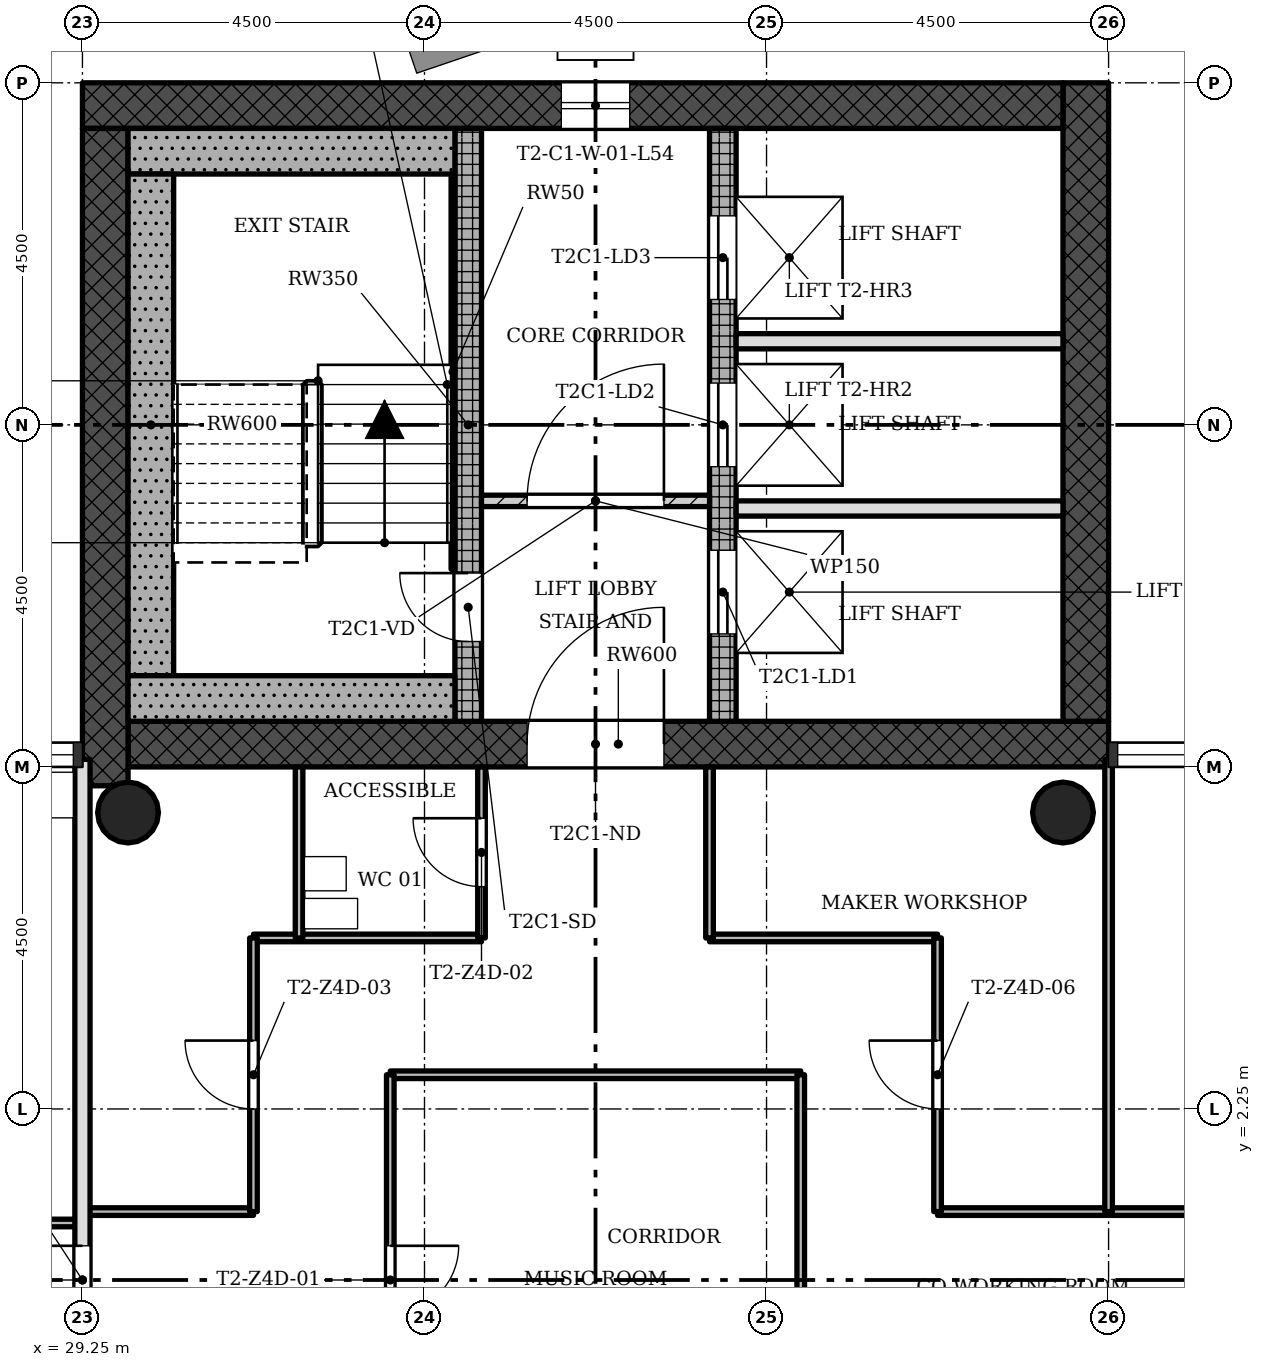
"""IFC4 building model, lengths in metres.
Left out: names, types, materials, properties, quantities, classifications, styles, units other than length and angle.
Written with IfcOpenShell. Run it as: python <this file> out.ifc"""

import sys

from ifc_helpers import new_model, si_unit, direction, frame, frame_2d, origin, origin_2d, place, context, subcontext, project, spatial, rectangle, hollow_circle, extrude, element, fill, save


model = new_model("IFC4")
c1 = context("Model", 3, precision=1e-05, world=origin(), true_north=direction((0.0, 1.0)))
c2 = subcontext(c1, "Body", "Model", "MODEL_VIEW")
j1 = project(units=[si_unit("LENGTHUNIT", "METRE"), si_unit("PLANEANGLEUNIT", "RADIAN")], contexts=[c1])
p1 = place(None, origin())
s1 = spatial("IfcSite", under=j1, at=p1, CompositionType="ELEMENT")
p2 = place(p1, origin())
s2 = spatial("IfcBuilding", under=s1, at=p2, CompositionType="ELEMENT")
p3 = place(p2, frame((0.0, 0.0, 196.0)))
s3 = spatial("IfcBuildingStorey", under=s2, at=p3, CompositionType="ELEMENT", Elevation=196.0)
p4 = place(p3, frame((29.85, 7.05, 0.0), z_axis=(0.0, 0.0, 1.0), x_axis=(1.0, 0.0, 0.0)))
e1 = element("IfcWall", 1, at=p4, inside=s3, PredefinedType="SHEAR", context=c2, shape_type="SweptSolid", body=[
    extrude(rectangle(XDim=12.9, YDim=0.6, at=frame_2d((6.45, 0.0))), origin(), (0.0, 0.0, 1.0), 3.4),
])
p5 = place(p4, frame((5.25, 0.0, 0.0)))
e2 = element("IfcOpeningElement", 2, at=p5, cuts=e1, PredefinedType="OPENING", context=c2, shape_type="SweptSolid", body=[
    extrude(rectangle(XDim=1.8, YDim=2.1, at=frame_2d((0.9, 1.05))), frame((0.0, 0.31, 0.0), z_axis=(0.0, -1.0, 0.0), x_axis=(1.0, 0.0, 0.0)), (0.0, 0.0, 1.0), 0.62),
])
p6 = place(p3, frame((42.45, 7.35, 0.0), z_axis=(0.0, 0.0, 1.0), x_axis=(0.0, 1.0, 0.0)))
e3 = element("IfcWall", 3, at=p6, inside=s3, PredefinedType="SHEAR", context=c2, shape_type="SweptSolid", body=[
    extrude(rectangle(XDim=8.4, YDim=0.6, at=frame_2d((4.2, 0.0))), origin(), (0.0, 0.0, 1.0), 3.4),
])
p7 = place(p3, frame((42.15, 15.45, 0.0), z_axis=(0.0, 0.0, 1.0), x_axis=(-1.0, 0.0, 0.0)))
e4 = element("IfcWall", 4, at=p7, inside=s3, PredefinedType="SHEAR", context=c2, shape_type="SweptSolid", body=[
    extrude(rectangle(XDim=12.9, YDim=0.6, at=frame_2d((6.45, 0.0))), origin(), (0.0, 0.0, 1.0), 3.4),
])
p8 = place(p7, frame((5.7, 0.0, 0.45)))
e5 = element("IfcOpeningElement", 5, at=p8, cuts=e4, PredefinedType="OPENING", context=c2, shape_type="SweptSolid", body=[
    extrude(rectangle(XDim=0.9, YDim=2.4, at=frame_2d((0.45, 1.2))), frame((0.0, 0.31, 0.0), z_axis=(0.0, -1.0, 0.0), x_axis=(1.0, 0.0, 0.0)), (0.0, 0.0, 1.0), 0.62),
])
p9 = place(p3, frame((29.55, 15.15, 0.0), z_axis=(0.0, 0.0, 1.0), x_axis=(0.0, -1.0, 0.0)))
e6 = element("IfcWall", 6, at=p9, inside=s3, PredefinedType="SHEAR", context=c2, shape_type="SweptSolid", body=[
    extrude(rectangle(XDim=8.648, YDim=0.6, at=frame_2d((4.324, 0.0))), origin(), (0.0, 0.0, 1.0), 3.4),
])
p10 = place(p3, frame((34.325, 7.35, 0.0), z_axis=(0.0, 0.0, 1.0), x_axis=(0.0, 1.0, 0.0)))
e7 = element("IfcWall", 7, at=p10, inside=s3, PredefinedType="SHEAR", context=c2, shape_type="SweptSolid", body=[
    extrude(rectangle(XDim=7.8, YDim=0.35, at=frame_2d((3.9, 0.0))), origin(), (0.0, 0.0, 1.0), 3.4),
])
p11 = place(p10, frame((1.05, 0.0, 0.0)))
e8 = element("IfcOpeningElement", 8, at=p11, cuts=e7, PredefinedType="OPENING", context=c2, shape_type="SweptSolid", body=[
    extrude(rectangle(XDim=0.9, YDim=2.1, at=frame_2d((0.45, 1.05))), frame((0.0, 0.185, 0.0), z_axis=(0.0, -1.0, 0.0), x_axis=(1.0, 0.0, 0.0)), (0.0, 0.0, 1.0), 0.37),
])
p12 = place(p3, frame((37.675, 7.35, 0.0), z_axis=(0.0, 0.0, 1.0), x_axis=(0.0, 1.0, 0.0)))
e9 = element("IfcWall", 9, at=p12, inside=s3, PredefinedType="SHEAR", context=c2, shape_type="SweptSolid", body=[
    extrude(rectangle(XDim=7.8, YDim=0.35, at=frame_2d((3.9, 0.0))), origin(), (0.0, 0.0, 1.0), 3.4),
])
p13 = place(p12, frame((1.15, 0.0, 0.0)))
e10 = element("IfcOpeningElement", 10, at=p13, cuts=e9, PredefinedType="OPENING", context=c2, shape_type="SweptSolid", body=[
    extrude(rectangle(XDim=1.1, YDim=2.1, at=frame_2d((0.55, 1.05))), frame((0.0, 0.185, 0.0), z_axis=(0.0, -1.0, 0.0), x_axis=(1.0, 0.0, 0.0)), (0.0, 0.0, 1.0), 0.37),
])
p14 = place(p12, frame((3.35, 0.0, 0.0)))
e11 = element("IfcOpeningElement", 11, at=p14, cuts=e9, PredefinedType="OPENING", context=c2, shape_type="SweptSolid", body=[
    extrude(rectangle(XDim=1.1, YDim=2.1, at=frame_2d((0.55, 1.05))), frame((0.0, 0.185, 0.0), z_axis=(0.0, -1.0, 0.0), x_axis=(1.0, 0.0, 0.0)), (0.0, 0.0, 1.0), 0.37),
])
p15 = place(p12, frame((5.55, 0.0, 0.0)))
e12 = element("IfcOpeningElement", 12, at=p15, cuts=e9, PredefinedType="OPENING", context=c2, shape_type="SweptSolid", body=[
    extrude(rectangle(XDim=1.1, YDim=2.1, at=frame_2d((0.55, 1.05))), frame((0.0, 0.185, 0.0), z_axis=(0.0, -1.0, 0.0), x_axis=(1.0, 0.0, 0.0)), (0.0, 0.0, 1.0), 0.37),
])
for number, where, z_axis, x_axis in (
    (13, (42.15, 6.15, 0.0), (0.0, 0.0, 1.0), (1.0, 0.0, 0.0)),
    (14, (29.85, 6.15, 0.0), (0.0, 0.0, 1.0), (1.0, 0.0, 0.0)),
):
    element("IfcColumn", number, at=place(p3, frame(where, z_axis=z_axis, x_axis=x_axis)), inside=s3, PredefinedType="COLUMN", context=c2, shape_type="SweptSolid", body=[
        extrude(hollow_circle(Radius=0.4, WallThickness=0.028, at=origin_2d()), origin(), (0.0, 0.0, 1.0), 3.4),
    ])
p16 = place(p3, frame((37.5, 10.25, 0.0), z_axis=(0.0, 0.0, 1.0), x_axis=(-1.0, 0.0, 0.0)))
e15 = element("IfcWall", 15, at=p16, inside=s3, PredefinedType="PARTITIONING", context=c2, shape_type="SweptSolid", body=[
    extrude(rectangle(XDim=3.0, YDim=0.15, at=frame_2d((1.5, 0.0))), origin(), (0.0, 0.0, 1.0), 3.0),
])
p17 = place(p16, frame((0.6, 0.0, 0.0)))
e16 = element("IfcOpeningElement", 16, at=p17, cuts=e15, PredefinedType="OPENING", context=c2, shape_type="SweptSolid", body=[
    extrude(rectangle(XDim=1.8, YDim=2.1, at=frame_2d((0.9, 1.05))), frame((0.0, 0.085, 0.0), z_axis=(0.0, -1.0, 0.0), x_axis=(1.0, 0.0, 0.0)), (0.0, 0.0, 1.0), 0.17),
])
for number, where, z_axis, x_axis in (
    (17, (42.15, 10.15, 0.0), (0.0, 0.0, 1.0), (-1.0, 0.0, 0.0)),
    (18, (42.15, 12.35, 0.0), (0.0, 0.0, 1.0), (-1.0, 0.0, 0.0)),
):
    element("IfcWall", number, at=place(p3, frame(where, z_axis=z_axis, x_axis=x_axis)), inside=s3, PredefinedType="SOLIDWALL", context=c2, shape_type="SweptSolid", body=[
        extrude(rectangle(XDim=4.3, YDim=0.2, at=frame_2d((2.15, 0.0))), origin(), (0.0, 0.0, 1.0), 3.0),
    ])
p18 = place(p3, frame((29.25, 0.75, 0.0), z_axis=(0.0, 0.0, 1.0), x_axis=(-1.0, 0.0, 0.0)))
e19 = element("IfcWall", 19, at=p18, inside=s3, PredefinedType="PARTITIONING", context=c2, shape_type="SweptSolid", body=[
    extrude(rectangle(XDim=7.8, YDim=0.1, at=frame_2d((3.9, 0.0))), origin(), (0.0, 0.0, 1.0), 3.0),
])
p19 = place(p18, frame((1.8, 0.0, 0.0)))
e20 = element("IfcOpeningElement", 20, at=p19, cuts=e19, PredefinedType="OPENING", context=c2, shape_type="SweptSolid", body=[
    extrude(rectangle(XDim=0.9, YDim=2.1, at=frame_2d((0.45, 1.05))), frame((0.0, 0.06, 0.0), z_axis=(0.0, -1.0, 0.0), x_axis=(1.0, 0.0, 0.0)), (0.0, 0.0, 1.0), 0.12),
])
p20 = place(p18, frame((4.95, 0.0, 0.0)))
e21 = element("IfcOpeningElement", 21, at=p20, cuts=e19, PredefinedType="OPENING", context=c2, shape_type="SweptSolid", body=[
    extrude(rectangle(XDim=0.9, YDim=2.1, at=frame_2d((0.45, 1.05))), frame((0.0, 0.06, 0.0), z_axis=(0.0, -1.0, 0.0), x_axis=(1.0, 0.0, 0.0)), (0.0, 0.0, 1.0), 0.12),
])
p21 = place(p18, frame((6.6, 0.0, 0.0)))
e22 = element("IfcOpeningElement", 22, at=p21, cuts=e19, PredefinedType="OPENING", context=c2, shape_type="SweptSolid", body=[
    extrude(rectangle(XDim=0.9, YDim=2.1, at=frame_2d((0.45, 1.05))), frame((0.0, 0.06, 0.0), z_axis=(0.0, -1.0, 0.0), x_axis=(1.0, 0.0, 0.0)), (0.0, 0.0, 1.0), 0.12),
])
p22 = place(p3, frame((44.55, 0.9, 0.0), z_axis=(0.0, 0.0, 1.0), x_axis=(-1.0, 0.0, 0.0)))
e23 = element("IfcWall", 23, at=p22, inside=s3, PredefinedType="PARTITIONING", context=c2, shape_type="SweptSolid", body=[
    extrude(rectangle(XDim=4.05, YDim=0.1, at=frame_2d((2.025, 0.0))), origin(), (0.0, 0.0, 1.0), 3.0),
])
p23 = place(p3, frame((31.5, 0.9, 0.0), z_axis=(0.0, 0.0, 1.0), x_axis=(-1.0, 0.0, 0.0)))
e24 = element("IfcWall", 24, at=p23, inside=s3, PredefinedType="PARTITIONING", context=c2, shape_type="SweptSolid", body=[
    extrude(rectangle(XDim=2.25, YDim=0.1, at=frame_2d((1.125, 0.0))), origin(), (0.0, 0.0, 1.0), 3.0),
])
p24 = place(p3, frame((38.7, 2.7, 0.0), z_axis=(0.0, 0.0, 1.0), x_axis=(-1.0, 0.0, 0.0)))
e25 = element("IfcWall", 25, at=p24, inside=s3, PredefinedType="PARTITIONING", context=c2, shape_type="SweptSolid", body=[
    extrude(rectangle(XDim=5.4, YDim=0.1, at=frame_2d((2.7, 0.0))), origin(), (0.0, 0.0, 1.0), 3.0),
])
for number, where, z_axis, x_axis in (
    (26, (40.5, 4.5, 0.0), (0.0, 0.0, 1.0), (-1.0, 0.0, 0.0)),
    (27, (34.5, 4.5, 0.0), (0.0, 0.0, 1.0), (-1.0, 0.0, 0.0)),
):
    element("IfcWall", number, at=place(p3, frame(where, z_axis=z_axis, x_axis=x_axis)), inside=s3, PredefinedType="PARTITIONING", context=c2, shape_type="SweptSolid", body=[
        extrude(rectangle(XDim=3.0, YDim=0.1, at=frame_2d((1.5, 0.0))), origin(), (0.0, 0.0, 1.0), 3.0),
    ])
p25 = place(p3, frame((42.75, 0.9, 0.0), z_axis=(0.0, 0.0, 1.0), x_axis=(0.0, 1.0, 0.0)))
e28 = element("IfcWall", 28, at=p25, inside=s3, PredefinedType="PARTITIONING", context=c2, shape_type="SweptSolid", body=[
    extrude(rectangle(XDim=5.95, YDim=0.1, at=frame_2d((2.975, 0.0))), origin(), (0.0, 0.0, 1.0), 3.0),
])
p26 = place(p3, frame((40.5, 0.9, 0.0), z_axis=(0.0, 0.0, 1.0), x_axis=(0.0, 1.0, 0.0)))
e29 = element("IfcWall", 29, at=p26, inside=s3, PredefinedType="PARTITIONING", context=c2, shape_type="SweptSolid", body=[
    extrude(rectangle(XDim=3.6, YDim=0.1, at=frame_2d((1.8, 0.0))), origin(), (0.0, 0.0, 1.0), 3.0),
])
p27 = place(p26, frame((1.35, 0.0, 0.0)))
e30 = element("IfcOpeningElement", 30, at=p27, cuts=e29, PredefinedType="OPENING", context=c2, shape_type="SweptSolid", body=[
    extrude(rectangle(XDim=0.9, YDim=2.1, at=frame_2d((0.45, 1.05))), frame((0.0, 0.06, 0.0), z_axis=(0.0, -1.0, 0.0), x_axis=(1.0, 0.0, 0.0)), (0.0, 0.0, 1.0), 0.12),
])
p28 = place(p3, frame((38.7, -2.7, 0.0), z_axis=(0.0, 0.0, 1.0), x_axis=(0.0, 1.0, 0.0)))
e31 = element("IfcWall", 31, at=p28, inside=s3, PredefinedType="PARTITIONING", context=c2, shape_type="SweptSolid", body=[
    extrude(rectangle(XDim=5.4, YDim=0.1, at=frame_2d((2.7, 0.0))), origin(), (0.0, 0.0, 1.0), 3.0),
])
p29 = place(p3, frame((37.5, 4.5, 0.0), z_axis=(0.0, 0.0, 1.0), x_axis=(0.0, 1.0, 0.0)))
e32 = element("IfcWall", 32, at=p29, inside=s3, PredefinedType="PARTITIONING", context=c2, shape_type="SweptSolid", body=[
    extrude(rectangle(XDim=2.25, YDim=0.1, at=frame_2d((1.125, 0.0))), origin(), (0.0, 0.0, 1.0), 3.0),
])
p30 = place(p3, frame((34.5, 4.5, 0.0), z_axis=(0.0, 0.0, 1.0), x_axis=(0.0, 1.0, 0.0)))
e33 = element("IfcWall", 33, at=p30, inside=s3, PredefinedType="PARTITIONING", context=c2, shape_type="SweptSolid", body=[
    extrude(rectangle(XDim=2.25, YDim=0.1, at=frame_2d((1.125, 0.0))), origin(), (0.0, 0.0, 1.0), 3.0),
])
p31 = place(p30, frame((0.675, 0.0, 0.0)))
e34 = element("IfcOpeningElement", 34, at=p31, cuts=e33, PredefinedType="OPENING", context=c2, shape_type="SweptSolid", body=[
    extrude(rectangle(XDim=0.9, YDim=2.1, at=frame_2d((0.45, 1.05))), frame((0.0, 0.06, 0.0), z_axis=(0.0, -1.0, 0.0), x_axis=(1.0, 0.0, 0.0)), (0.0, 0.0, 1.0), 0.12),
])
p32 = place(p3, frame((33.3, -2.7, 0.0), z_axis=(0.0, 0.0, 1.0), x_axis=(0.0, 1.0, 0.0)))
e35 = element("IfcWall", 35, at=p32, inside=s3, PredefinedType="PARTITIONING", context=c2, shape_type="SweptSolid", body=[
    extrude(rectangle(XDim=5.4, YDim=0.1, at=frame_2d((2.7, 0.0))), origin(), (0.0, 0.0, 1.0), 3.0),
])
p33 = place(p32, frame((2.25, 0.0, 0.0)))
e36 = element("IfcOpeningElement", 36, at=p33, cuts=e35, PredefinedType="OPENING", context=c2, shape_type="SweptSolid", body=[
    extrude(rectangle(XDim=0.9, YDim=2.1, at=frame_2d((0.45, 1.05))), frame((0.0, 0.06, 0.0), z_axis=(0.0, -1.0, 0.0), x_axis=(1.0, 0.0, 0.0)), (0.0, 0.0, 1.0), 0.12),
])
p34 = place(p3, frame((32.1, 4.5, 0.0), z_axis=(0.0, 0.0, 1.0), x_axis=(0.0, 1.0, 0.0)))
e37 = element("IfcWall", 37, at=p34, inside=s3, PredefinedType="PARTITIONING", context=c2, shape_type="SweptSolid", body=[
    extrude(rectangle(XDim=2.25, YDim=0.1, at=frame_2d((1.125, 0.0))), origin(), (0.0, 0.0, 1.0), 3.0),
])
p35 = place(p3, frame((31.5, 0.9, 0.0), z_axis=(0.0, 0.0, 1.0), x_axis=(0.0, 1.0, 0.0)))
e38 = element("IfcWall", 38, at=p35, inside=s3, PredefinedType="PARTITIONING", context=c2, shape_type="SweptSolid", body=[
    extrude(rectangle(XDim=3.6, YDim=0.1, at=frame_2d((1.8, 0.0))), origin(), (0.0, 0.0, 1.0), 3.0),
])
p36 = place(p35, frame((1.35, 0.0, 0.0)))
e39 = element("IfcOpeningElement", 39, at=p36, cuts=e38, PredefinedType="OPENING", context=c2, shape_type="SweptSolid", body=[
    extrude(rectangle(XDim=0.9, YDim=2.1, at=frame_2d((0.45, 1.05))), frame((0.0, 0.06, 0.0), z_axis=(0.0, -1.0, 0.0), x_axis=(1.0, 0.0, 0.0)), (0.0, 0.0, 1.0), 0.12),
])
p37 = place(p3, frame((29.25, -6.85, 0.0), z_axis=(0.0, 0.0, 1.0), x_axis=(0.0, 1.0, 0.0)))
e40 = element("IfcWall", 40, at=p37, inside=s3, PredefinedType="SOLIDWALL", context=c2, shape_type="SweptSolid", body=[
    extrude(rectangle(XDim=13.7, YDim=0.2, at=frame_2d((6.85, 0.0))), origin(), (0.0, 0.0, 1.0), 3.0),
])
p38 = place(p37, frame((6.4, 0.0, 0.0)))
e41 = element("IfcOpeningElement", 41, at=p38, cuts=e40, PredefinedType="OPENING", context=c2, shape_type="SweptSolid", body=[
    extrude(rectangle(XDim=0.9, YDim=2.1, at=frame_2d((0.45, 1.05))), frame((0.0, 0.11, 0.0), z_axis=(0.0, -1.0, 0.0), x_axis=(1.0, 0.0, 0.0)), (0.0, 0.0, 1.0), 0.22),
])
p39 = place(p3, frame((34.15, 14.85, 0.0), z_axis=(0.0, 0.0, 1.0), x_axis=(-1.0, 0.0, 0.0)))
e42 = element("IfcWall", 42, at=p39, inside=s3, PredefinedType="SHEAR", context=c2, shape_type="SweptSolid", body=[
    extrude(rectangle(XDim=4.3, YDim=0.6, at=frame_2d((2.15, 0.0))), origin(), (0.0, 0.0, 1.0), 3.4),
])
p40 = place(p3, frame((30.15, 7.95, 0.0), z_axis=(0.0, 0.0, 1.0), x_axis=(0.0, 1.0, 0.0)))
e43 = element("IfcWall", 43, at=p40, inside=s3, PredefinedType="SHEAR", context=c2, shape_type="SweptSolid", body=[
    extrude(rectangle(XDim=6.6, YDim=0.6, at=frame_2d((3.3, 0.0))), origin(), (0.0, 0.0, 1.0), 3.4),
])
p41 = place(p3, frame((34.15, 7.65, 0.0), z_axis=(0.0, 0.0, 1.0), x_axis=(-1.0, 0.0, 0.0)))
e44 = element("IfcWall", 44, at=p41, inside=s3, PredefinedType="SHEAR", context=c2, shape_type="SweptSolid", body=[
    extrude(rectangle(XDim=4.3, YDim=0.6, at=frame_2d((2.15, 0.0))), origin(), (0.0, 0.0, 1.0), 3.4),
])
p42 = place(p3, frame((34.125, 9.35, 0.0), z_axis=(0.0, 0.0, 1.0), x_axis=(0.0, 1.0, 0.0)))
e45 = element("IfcWall", 45, at=p42, inside=s3, PredefinedType="SHEAR", context=c2, shape_type="SweptSolid", body=[
    extrude(rectangle(XDim=5.2, YDim=0.05, at=frame_2d((2.6, 0.0))), origin(), (0.0, 0.0, 1.0), 3.4),
])
p43 = place(p8, origin())
e46 = element("IfcWindow", 46, at=p43, inside=s3, PartitioningType="SINGLE_PANEL", PredefinedType="WINDOW", context=c2, shape_type="SweptSolid", body=[
    extrude(rectangle(XDim=0.9, YDim=2.4, at=frame_2d((0.45, 1.2))), frame((0.0, 0.03, 0.0), z_axis=(0.0, -1.0, 0.0), x_axis=(1.0, 0.0, 0.0)), (0.0, 0.0, 1.0), 0.06),
])
fill(e5, e46)
p44 = place(p17, origin())
e47 = element("IfcDoor", 47, at=p44, inside=s3, OperationType="SINGLE_SWING_LEFT", PredefinedType="DOOR", context=c2, shape_type="SweptSolid", body=[
    extrude(rectangle(XDim=1.8, YDim=2.1, at=frame_2d((0.9, 1.05))), frame((0.0, 0.025, 0.0), z_axis=(0.0, -1.0, 0.0), x_axis=(1.0, 0.0, 0.0)), (0.0, 0.0, 1.0), 0.05),
])
fill(e16, e47)
p45 = place(p33, origin())
e48 = element("IfcDoor", 48, at=p45, inside=s3, OperationType="SINGLE_SWING_RIGHT", PredefinedType="DOOR", context=c2, shape_type="SweptSolid", body=[
    extrude(rectangle(XDim=0.9, YDim=2.1, at=frame_2d((0.45, 1.05))), frame((0.0, 0.025, 0.0), z_axis=(0.0, -1.0, 0.0), x_axis=(1.0, 0.0, 0.0)), (0.0, 0.0, 1.0), 0.05),
])
fill(e36, e48)
p46 = place(p31, origin())
e49 = element("IfcDoor", 49, at=p46, inside=s3, OperationType="SINGLE_SWING_LEFT", PredefinedType="DOOR", context=c2, shape_type="SweptSolid", body=[
    extrude(rectangle(XDim=0.9, YDim=2.1, at=frame_2d((0.45, 1.05))), frame((0.0, 0.025, 0.0), z_axis=(0.0, -1.0, 0.0), x_axis=(1.0, 0.0, 0.0)), (0.0, 0.0, 1.0), 0.05),
])
fill(e34, e49)
p47 = place(p36, origin())
e50 = element("IfcDoor", 50, at=p47, inside=s3, OperationType="SINGLE_SWING_LEFT", PredefinedType="DOOR", context=c2, shape_type="SweptSolid", body=[
    extrude(rectangle(XDim=0.9, YDim=2.1, at=frame_2d((0.45, 1.05))), frame((0.0, 0.025, 0.0), z_axis=(0.0, -1.0, 0.0), x_axis=(1.0, 0.0, 0.0)), (0.0, 0.0, 1.0), 0.05),
])
fill(e39, e50)
p48 = place(p27, origin())
e51 = element("IfcDoor", 51, at=p48, inside=s3, OperationType="SINGLE_SWING_LEFT", PredefinedType="DOOR", context=c2, shape_type="SweptSolid", body=[
    extrude(rectangle(XDim=0.9, YDim=2.1, at=frame_2d((0.45, 1.05))), frame((0.0, 0.025, 0.0), z_axis=(0.0, -1.0, 0.0), x_axis=(1.0, 0.0, 0.0)), (0.0, 0.0, 1.0), 0.05),
])
fill(e30, e51)
p49 = place(p38, origin())
e52 = element("IfcDoor", 52, at=p49, inside=s3, OperationType="SINGLE_SWING_LEFT", PredefinedType="DOOR", context=c2, shape_type="SweptSolid", body=[
    extrude(rectangle(XDim=0.9, YDim=2.1, at=frame_2d((0.45, 1.05))), frame((0.0, 0.025, 0.0), z_axis=(0.0, -1.0, 0.0), x_axis=(1.0, 0.0, 0.0)), (0.0, 0.0, 1.0), 0.05),
])
fill(e41, e52)
p50 = place(p11, origin())
e53 = element("IfcDoor", 53, at=p50, inside=s3, OperationType="SINGLE_SWING_LEFT", PredefinedType="DOOR", context=c2, shape_type="SweptSolid", body=[
    extrude(rectangle(XDim=0.9, YDim=2.1, at=frame_2d((0.45, 1.05))), frame((0.0, 0.025, 0.0), z_axis=(0.0, -1.0, 0.0), x_axis=(1.0, 0.0, 0.0)), (0.0, 0.0, 1.0), 0.05),
])
fill(e8, e53)
p51 = place(p13, origin())
e54 = element("IfcDoor", 54, at=p51, inside=s3, OperationType="SLIDING_TO_LEFT", PredefinedType="DOOR", context=c2, shape_type="SweptSolid", body=[
    extrude(rectangle(XDim=1.1, YDim=2.1, at=frame_2d((0.55, 1.05))), frame((0.0, 0.025, 0.0), z_axis=(0.0, -1.0, 0.0), x_axis=(1.0, 0.0, 0.0)), (0.0, 0.0, 1.0), 0.05),
])
fill(e10, e54)
p52 = place(p14, origin())
e55 = element("IfcDoor", 55, at=p52, inside=s3, OperationType="SLIDING_TO_LEFT", PredefinedType="DOOR", context=c2, shape_type="SweptSolid", body=[
    extrude(rectangle(XDim=1.1, YDim=2.1, at=frame_2d((0.55, 1.05))), frame((0.0, 0.025, 0.0), z_axis=(0.0, -1.0, 0.0), x_axis=(1.0, 0.0, 0.0)), (0.0, 0.0, 1.0), 0.05),
])
fill(e11, e55)
p53 = place(p15, origin())
e56 = element("IfcDoor", 56, at=p53, inside=s3, OperationType="SLIDING_TO_LEFT", PredefinedType="DOOR", context=c2, shape_type="SweptSolid", body=[
    extrude(rectangle(XDim=1.1, YDim=2.1, at=frame_2d((0.55, 1.05))), frame((0.0, 0.025, 0.0), z_axis=(0.0, -1.0, 0.0), x_axis=(1.0, 0.0, 0.0)), (0.0, 0.0, 1.0), 0.05),
])
fill(e12, e56)
p54 = place(p5, origin())
e57 = element("IfcDoor", 57, at=p54, inside=s3, OperationType="SINGLE_SWING_LEFT", PredefinedType="DOOR", context=c2, shape_type="SweptSolid", body=[
    extrude(rectangle(XDim=1.8, YDim=2.1, at=frame_2d((0.9, 1.05))), frame((0.0, 0.025, 0.0), z_axis=(0.0, -1.0, 0.0), x_axis=(1.0, 0.0, 0.0)), (0.0, 0.0, 1.0), 0.05),
])
fill(e2, e57)
save(model, sys.argv[1])
